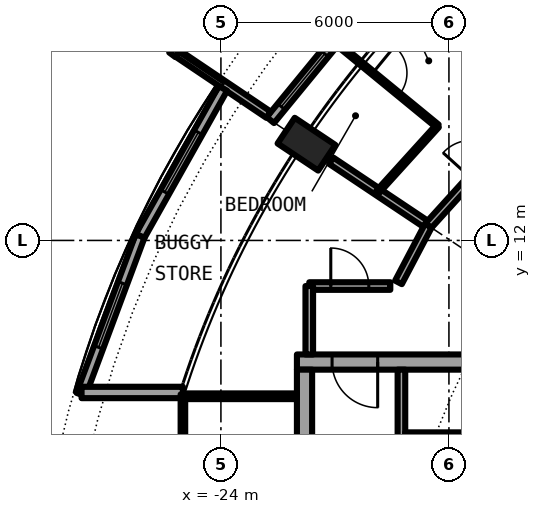
"""IFC4 building model, lengths in metres.
Left out: names, types, materials, properties, quantities, classifications, styles, units other than length and angle.
Written with IfcOpenShell. Run it as: python <this file> out.ifc"""

import sys

from ifc_helpers import new_model, si_unit, direction, frame, frame_2d, origin, origin_2d, place, context, subcontext, project, spatial, rectangle, circle, hollow_circle, extrude, element, fill, save


model = new_model("IFC4")
c1 = context("Model", 3, precision=1e-05, world=origin(), true_north=direction((0.0, 1.0)))
c2 = subcontext(c1, "Body", "Model", "MODEL_VIEW")
j1 = project(units=[si_unit("LENGTHUNIT", "METRE"), si_unit("PLANEANGLEUNIT", "RADIAN")], contexts=[c1])
p1 = place(None, origin())
s1 = spatial("IfcSite", under=j1, at=p1, CompositionType="ELEMENT")
p2 = place(p1, origin())
s2 = spatial("IfcBuilding", under=s1, at=p2, CompositionType="ELEMENT")
p3 = place(p2, frame((0.0, 0.0, 234.05)))
s3 = spatial("IfcBuildingStorey", under=s2, at=p3, CompositionType="ELEMENT", Elevation=234.05)
p4 = place(p3, frame((-22.283, 14.889, 0.0), z_axis=(0.346913947437, -0.231777820067, 0.908806775502), x_axis=(0.555532669549, 0.831494710184, 0.0)))
e1 = element("IfcColumn", 1, at=p4, inside=s3, PredefinedType="COLUMN", context=c2, shape_type="SweptSolid", body=[
    extrude(hollow_circle(Radius=0.406, WallThickness=0.03, at=origin_2d()), origin(), (0.0, 0.0, 1.0), 3.081),
])
p5 = place(p3, frame((-19.304, 19.304, 0.0), z_axis=(0.0, 0.0, 1.0), x_axis=(-0.634382322723, -0.773019449054, 0.0)))
e2 = element("IfcWall", 2, at=p5, inside=s3, PredefinedType="SOLIDWALL", context=c2, shape_type="SweptSolid", body=[
    extrude(rectangle(XDim=5.352, YDim=0.25, at=frame_2d((2.676, 0.0))), origin(), (0.0, 0.0, 1.0), 2.7),
])
p6 = place(p5, frame((0.841, 0.0, 0.0)))
e3 = element("IfcOpeningElement", 3, at=p6, cuts=e2, PredefinedType="OPENING", context=c2, shape_type="SweptSolid", body=[
    extrude(rectangle(XDim=1.0, YDim=2.2, at=frame_2d((0.5, 1.1))), frame((0.0, 0.135, 0.0), z_axis=(0.0, -1.0, 0.0), x_axis=(1.0, 0.0, 0.0)), (0.0, 0.0, 1.0), 0.27),
])
p7 = place(p5, frame((3.096, 0.0, 0.3)))
e4 = element("IfcOpeningElement", 4, at=p7, cuts=e2, PredefinedType="OPENING", context=c2, shape_type="SweptSolid", body=[
    extrude(rectangle(XDim=1.8, YDim=2.1, at=frame_2d((0.9, 1.05))), frame((0.0, 0.135, 0.0), z_axis=(0.0, -1.0, 0.0), x_axis=(1.0, 0.0, 0.0)), (0.0, 0.0, 1.0), 0.27),
])
p8 = place(p3, frame((-23.496, 19.289, -0.03), z_axis=(0.0, 0.0, 1.0), x_axis=(-0.595908005124, -0.803052706508, 0.0)))
e5 = element("IfcWall", 5, at=p8, inside=s3, PredefinedType="SOLIDWALL", context=c2, shape_type="SweptSolid", body=[
    extrude(rectangle(XDim=2.994, YDim=0.2, at=frame_2d((1.497, 0.0))), origin(), (0.0, 0.0, 1.0), 2.73),
])
p9 = place(p8, frame((0.457, 0.0, 0.33)))
e6 = element("IfcOpeningElement", 6, at=p9, cuts=e5, PredefinedType="OPENING", context=c2, shape_type="SweptSolid", body=[
    extrude(circle(Radius=1.04, at=frame_2d((1.04, 1.04))), frame((0.0, 0.11, 0.0), z_axis=(0.0, -1.0, 0.0), x_axis=(1.0, 0.0, 0.0)), (0.0, 0.0, 1.0), 0.22),
])
p10 = place(p3, frame((-22.746, 15.307, -0.03), z_axis=(0.0, 0.0, 1.0), x_axis=(-0.829448139117, 0.558583730979, 0.0)))
e7 = element("IfcWall", 7, at=p10, inside=s3, PredefinedType="SOLIDWALL", context=c2, shape_type="SweptSolid", body=[
    extrude(rectangle(XDim=2.883, YDim=0.2, at=frame_2d((1.441, 0.0))), origin(), (0.0, 0.0, 1.0), 2.73),
])
p11 = place(p3, frame((-23.946, 16.0, 0.0), z_axis=(0.0, 0.0, 1.0), x_axis=(-0.489696356642, -0.871893042919, 0.0)))
e8 = element("IfcWall", 8, at=p11, inside=s3, PredefinedType="SOLIDWALL", context=c2, shape_type="SweptSolid", body=[
    extrude(rectangle(XDim=4.454, YDim=0.25, at=frame_2d((2.227, 0.0))), origin(), (0.0, 0.0, 1.0), 2.7),
])
p12 = place(p11, frame((1.327, 0.0, 0.3)))
e9 = element("IfcOpeningElement", 9, at=p12, cuts=e8, PredefinedType="OPENING", context=c2, shape_type="SweptSolid", body=[
    extrude(rectangle(XDim=1.8, YDim=2.1, at=frame_2d((0.9, 1.05))), frame((0.0, 0.135, 0.0), z_axis=(0.0, -1.0, 0.0), x_axis=(1.0, 0.0, 0.0)), (0.0, 0.0, 1.0), 0.27),
])
p13 = place(p3, frame((-26.127, 12.117, 0.0), z_axis=(0.0, 0.0, 1.0), x_axis=(-0.349247811493, -0.937030397675, 0.0)))
e10 = element("IfcWall", 10, at=p13, inside=s3, PredefinedType="SOLIDWALL", context=c2, shape_type="SweptSolid", body=[
    extrude(rectangle(XDim=4.452, YDim=0.25, at=frame_2d((2.226, 0.0))), origin(), (0.0, 0.0, 1.0), 2.7),
])
p14 = place(p13, frame((1.327, 0.0, 0.3)))
e11 = element("IfcOpeningElement", 11, at=p14, cuts=e10, PredefinedType="OPENING", context=c2, shape_type="SweptSolid", body=[
    extrude(rectangle(XDim=1.8, YDim=2.1, at=frame_2d((0.9, 1.05))), frame((0.0, 0.135, 0.0), z_axis=(0.0, -1.0, 0.0), x_axis=(1.0, 0.0, 0.0)), (0.0, 0.0, 1.0), 0.27),
])
p15 = place(p3, frame((-25.0, 8.0, 0.0), z_axis=(0.0, 0.0, 1.0), x_axis=(-1.0, 0.0, 0.0)))
e12 = element("IfcWall", 12, at=p15, inside=s3, PredefinedType="SOLIDWALL", context=c2, shape_type="SweptSolid", body=[
    extrude(rectangle(XDim=2.667, YDim=0.3, at=frame_2d((1.333, 0.0))), origin(), (0.0, 0.0, 1.0), 2.7),
])
p16 = place(p3, frame((-8.6, 8.8, 0.0), z_axis=(0.0, 0.0, 1.0), x_axis=(-1.0, 0.0, 0.0)))
e13 = element("IfcWall", 13, at=p16, inside=s3, PredefinedType="SHEAR", context=c2, shape_type="SweptSolid", body=[
    extrude(rectangle(XDim=13.4, YDim=0.4, at=frame_2d((6.7, 0.0))), origin(), (0.0, 0.0, 1.0), 3.05),
])
p17 = place(p16, frame((11.275, 0.0, 0.0)))
e14 = element("IfcOpeningElement", 14, at=p17, cuts=e13, PredefinedType="OPENING", context=c2, shape_type="SweptSolid", body=[
    extrude(rectangle(XDim=1.2, YDim=2.3, at=frame_2d((0.6, 1.15))), frame((0.0, 0.21, 0.0), z_axis=(0.0, -1.0, 0.0), x_axis=(1.0, 0.0, 0.0)), (0.0, 0.0, 1.0), 0.42),
])
p18 = place(p3, frame((-21.8, -8.6, 0.0), z_axis=(0.0, 0.0, 1.0), x_axis=(0.0, 1.0, 0.0)))
e15 = element("IfcWall", 15, at=p18, inside=s3, PredefinedType="SHEAR", context=c2, shape_type="SweptSolid", body=[
    extrude(rectangle(XDim=17.2, YDim=0.4, at=frame_2d((8.6, 0.0))), origin(), (0.0, 0.0, 1.0), 3.05),
])
p19 = place(p18, frame((7.7, 0.0, 0.0)))
e16 = element("IfcOpeningElement", 16, at=p19, cuts=e15, PredefinedType="OPENING", context=c2, shape_type="SweptSolid", body=[
    extrude(rectangle(XDim=1.8, YDim=2.3, at=frame_2d((0.9, 1.15))), frame((0.0, 0.21, 0.0), z_axis=(0.0, -1.0, 0.0), x_axis=(1.0, 0.0, 0.0)), (0.0, 0.0, 1.0), 0.42),
])
p20 = place(p3, frame((-19.25, 8.6, 0.0), z_axis=(0.0, 0.0, 1.0), x_axis=(0.0, -1.0, 0.0)))
e17 = element("IfcWall", 17, at=p20, inside=s3, PredefinedType="SOLIDWALL", context=c2, shape_type="SweptSolid", body=[
    extrude(rectangle(XDim=7.025, YDim=0.2, at=frame_2d((3.513, 0.0))), origin(), (0.0, 0.0, 1.0), 2.7),
])
p21 = place(p20, frame((2.35, 0.0, 0.0)))
e18 = element("IfcOpeningElement", 18, at=p21, cuts=e17, PredefinedType="OPENING", context=c2, shape_type="SweptSolid", body=[
    extrude(rectangle(XDim=1.1, YDim=2.3, at=frame_2d((0.55, 1.15))), frame((0.0, 0.11, 0.0), z_axis=(0.0, -1.0, 0.0), x_axis=(1.0, 0.0, 0.0)), (0.0, 0.0, 1.0), 0.22),
])
p22 = place(p3, frame((-15.45, 6.875, 0.0), z_axis=(0.0, 0.0, 1.0), x_axis=(-1.0, 0.0, 0.0)))
e19 = element("IfcWall", 19, at=p22, inside=s3, PredefinedType="PARTITIONING", context=c2, shape_type="SweptSolid", body=[
    extrude(rectangle(XDim=3.7, YDim=0.15, at=frame_2d((1.85, 0.0))), origin(), (0.0, 0.0, 1.0), 2.7),
])
p23 = place(p22, frame((1.4, 0.0, 0.0)))
e20 = element("IfcOpeningElement", 20, at=p23, cuts=e19, PredefinedType="OPENING", context=c2, shape_type="SweptSolid", body=[
    extrude(rectangle(XDim=0.9, YDim=2.3, at=frame_2d((0.45, 1.15))), frame((0.0, 0.085, 0.0), z_axis=(0.0, -1.0, 0.0), x_axis=(1.0, 0.0, 0.0)), (0.0, 0.0, 1.0), 0.17),
])
p24 = place(p3, frame((-22.0, 7.9, 0.0), z_axis=(0.0, 0.0, 1.0), x_axis=(-1.0, 0.0, 0.0)))
e21 = element("IfcWall", 21, at=p24, inside=s3, PredefinedType="PARTITIONING", context=c2, shape_type="SweptSolid", body=[
    extrude(rectangle(XDim=2.94, YDim=0.15, at=frame_2d((1.47, 0.0))), origin(), (0.0, 0.0, 1.0), 2.7),
])
p25 = place(p3, frame((-25.0, 7.95, 0.0), z_axis=(0.0, 0.0, 1.0), x_axis=(0.0, -1.0, 0.0)))
e22 = element("IfcWall", 22, at=p25, inside=s3, PredefinedType="PARTITIONING", context=c2, shape_type="SweptSolid", body=[
    extrude(rectangle(XDim=15.9, YDim=0.12, at=frame_2d((7.95, 0.0))), origin(), (0.0, 0.0, 1.0), 2.7),
])
p26 = place(p25, frame((0.95, 0.0, 0.1)))
e23 = element("IfcOpeningElement", 23, at=p26, cuts=e22, PredefinedType="OPENING", context=c2, shape_type="SweptSolid", body=[
    extrude(rectangle(XDim=14.0, YDim=2.35, at=frame_2d((7.0, 1.175))), frame((0.0, 0.07, 0.0), z_axis=(0.0, -1.0, 0.0), x_axis=(1.0, 0.0, 0.0)), (0.0, 0.0, 1.0), 0.14),
])
p27 = place(p3, frame((-21.097, 14.097, 0.0), z_axis=(0.0, 0.0, 1.0), x_axis=(0.831340764735, -0.555763018642, 0.0)))
e24 = element("IfcWall", 24, at=p27, inside=s3, PredefinedType="PARTITIONING", context=c2, shape_type="SweptSolid", body=[
    extrude(rectangle(XDim=3.073, YDim=0.2, at=frame_2d((1.537, 0.0))), origin(), (0.0, 0.0, 1.0), 2.7),
])
p28 = place(p3, frame((-21.012, 17.233, 0.0), z_axis=(0.0, 0.0, 1.0), x_axis=(0.773165322764, -0.634204528267, 0.0)))
e25 = element("IfcWall", 25, at=p28, inside=s3, PredefinedType="PARTITIONING", context=c2, shape_type="SweptSolid", body=[
    extrude(rectangle(XDim=3.505, YDim=0.1, at=frame_2d((1.752, 0.0))), origin(), (0.0, 0.0, 1.0), 2.7),
])
p29 = place(p28, frame((1.303, 0.0, 0.0)))
e26 = element("IfcOpeningElement", 26, at=p29, cuts=e25, PredefinedType="OPENING", context=c2, shape_type="SweptSolid", body=[
    extrude(rectangle(XDim=0.9, YDim=2.3, at=frame_2d((0.45, 1.15))), frame((0.0, 0.06, 0.0), z_axis=(0.0, -1.0, 0.0), x_axis=(1.0, 0.0, 0.0)), (0.0, 0.0, 1.0), 0.12),
])
p30 = place(p3, frame((-21.675, 10.8, 0.0), z_axis=(0.0, 0.0, 1.0), x_axis=(1.0, 0.0, 0.0)))
e27 = element("IfcWall", 27, at=p30, inside=s3, PredefinedType="PARTITIONING", context=c2, shape_type="SweptSolid", body=[
    extrude(rectangle(XDim=2.132, YDim=0.2, at=frame_2d((1.066, 0.0))), origin(), (0.0, 0.0, 1.0), 2.7),
])
p31 = place(p30, frame((0.566, 0.0, 0.0)))
e28 = element("IfcOpeningElement", 28, at=p31, cuts=e27, PredefinedType="OPENING", context=c2, shape_type="SweptSolid", body=[
    extrude(rectangle(XDim=1.0, YDim=2.3, at=frame_2d((0.5, 1.15))), frame((0.0, 0.11, 0.0), z_axis=(0.0, -1.0, 0.0), x_axis=(1.0, 0.0, 0.0)), (0.0, 0.0, 1.0), 0.22),
])
p32 = place(p3, frame((-21.675, 9.0, 0.0), z_axis=(0.0, 0.0, 1.0), x_axis=(0.0, 1.0, 0.0)))
e29 = element("IfcWall", 29, at=p32, inside=s3, PredefinedType="PARTITIONING", context=c2, shape_type="SweptSolid", body=[
    extrude(rectangle(XDim=1.8, YDim=0.2, at=frame_2d((0.9, 0.0))), origin(), (0.0, 0.0, 1.0), 2.7),
])
p33 = place(p3, frame((-18.542, 12.389, 0.0), z_axis=(0.0, 0.0, 1.0), x_axis=(0.671561669125, 0.740948665268, 0.0)))
e30 = element("IfcWall", 30, at=p33, inside=s3, PredefinedType="PARTITIONING", context=c2, shape_type="SweptSolid", body=[
    extrude(rectangle(XDim=6.544, YDim=0.2, at=frame_2d((3.272, 0.0))), origin(), (0.0, 0.0, 1.0), 2.7),
])
p34 = place(p33, frame((1.682, 0.0, 0.0)))
e31 = element("IfcOpeningElement", 31, at=p34, cuts=e30, PredefinedType="OPENING", context=c2, shape_type="SweptSolid", body=[
    extrude(rectangle(XDim=1.0, YDim=2.3, at=frame_2d((0.5, 1.15))), frame((0.0, 0.11, 0.0), z_axis=(0.0, -1.0, 0.0), x_axis=(1.0, 0.0, 0.0)), (0.0, 0.0, 1.0), 0.22),
])
p35 = place(p3, frame((-19.328, 10.896, 0.0), z_axis=(0.0, 0.0, 1.0), x_axis=(0.465812036273, 0.88488369115, 0.0)))
e32 = element("IfcWall", 32, at=p35, inside=s3, PredefinedType="PARTITIONING", context=c2, shape_type="SweptSolid", body=[
    extrude(rectangle(XDim=1.687, YDim=0.2, at=frame_2d((0.844, 0.0))), origin(), (0.0, 0.0, 1.0), 2.7),
])
p36 = place(p3, frame((-19.872, 13.278, 0.0), z_axis=(0.0, 0.0, 1.0), x_axis=(0.671637685376, 0.740879760544, 0.0)))
e33 = element("IfcWall", 33, at=p36, inside=s3, PredefinedType="PARTITIONING", context=c2, shape_type="SweptSolid", body=[
    extrude(rectangle(XDim=2.338, YDim=0.1, at=frame_2d((1.169, 0.0))), origin(), (0.0, 0.0, 1.0), 2.7),
])
p37 = place(p7, origin())
e34 = element("IfcWindow", 34, at=p37, inside=s3, PartitioningType="SINGLE_PANEL", PredefinedType="WINDOW", context=c2, shape_type="SweptSolid", body=[
    extrude(rectangle(XDim=1.8, YDim=2.1, at=frame_2d((0.9, 1.05))), frame((0.0, 0.03, 0.0), z_axis=(0.0, -1.0, 0.0), x_axis=(1.0, 0.0, 0.0)), (0.0, 0.0, 1.0), 0.06),
])
fill(e4, e34)
p38 = place(p12, origin())
e35 = element("IfcWindow", 35, at=p38, inside=s3, PartitioningType="SINGLE_PANEL", PredefinedType="WINDOW", context=c2, shape_type="SweptSolid", body=[
    extrude(rectangle(XDim=1.8, YDim=2.1, at=frame_2d((0.9, 1.05))), frame((0.0, 0.03, 0.0), z_axis=(0.0, -1.0, 0.0), x_axis=(1.0, 0.0, 0.0)), (0.0, 0.0, 1.0), 0.06),
])
fill(e9, e35)
p39 = place(p14, origin())
e36 = element("IfcWindow", 36, at=p39, inside=s3, PartitioningType="SINGLE_PANEL", PredefinedType="WINDOW", context=c2, shape_type="SweptSolid", body=[
    extrude(rectangle(XDim=1.8, YDim=2.1, at=frame_2d((0.9, 1.05))), frame((0.0, 0.03, 0.0), z_axis=(0.0, -1.0, 0.0), x_axis=(1.0, 0.0, 0.0)), (0.0, 0.0, 1.0), 0.06),
])
fill(e11, e36)
p40 = place(p23, origin())
e37 = element("IfcDoor", 37, at=p40, inside=s3, OperationType="SINGLE_SWING_LEFT", PredefinedType="DOOR", context=c2, shape_type="SweptSolid", body=[
    extrude(rectangle(XDim=0.9, YDim=2.3, at=frame_2d((0.45, 1.15))), frame((0.0, 0.025, 0.0), z_axis=(0.0, -1.0, 0.0), x_axis=(1.0, 0.0, 0.0)), (0.0, 0.0, 1.0), 0.05),
])
fill(e20, e37)
p41 = place(p17, origin())
e38 = element("IfcDoor", 38, at=p41, inside=s3, OperationType="SINGLE_SWING_LEFT", PredefinedType="DOOR", context=c2, shape_type="SweptSolid", body=[
    extrude(rectangle(XDim=1.2, YDim=2.3, at=frame_2d((0.6, 1.15))), frame((0.0, 0.025, 0.0), z_axis=(0.0, -1.0, 0.0), x_axis=(1.0, 0.0, 0.0)), (0.0, 0.0, 1.0), 0.05),
])
fill(e14, e38)
p42 = place(p26, origin())
e39 = element("IfcWindow", 39, at=p42, inside=s3, PartitioningType="SINGLE_PANEL", PredefinedType="WINDOW", context=c2, shape_type="SweptSolid", body=[
    extrude(rectangle(XDim=14.0, YDim=2.35, at=frame_2d((7.0, 1.175))), frame((0.0, 0.03, 0.0), z_axis=(0.0, -1.0, 0.0), x_axis=(1.0, 0.0, 0.0)), (0.0, 0.0, 1.0), 0.06),
])
fill(e23, e39)
p43 = place(p29, origin())
e40 = element("IfcDoor", 40, at=p43, inside=s3, OperationType="SINGLE_SWING_LEFT", PredefinedType="DOOR", context=c2, shape_type="SweptSolid", body=[
    extrude(rectangle(XDim=0.9, YDim=2.3, at=frame_2d((0.45, 1.15))), frame((0.0, 0.025, 0.0), z_axis=(0.0, -1.0, 0.0), x_axis=(1.0, 0.0, 0.0)), (0.0, 0.0, 1.0), 0.05),
])
fill(e26, e40)
p44 = place(p31, origin())
e41 = element("IfcDoor", 41, at=p44, inside=s3, OperationType="SINGLE_SWING_LEFT", PredefinedType="DOOR", context=c2, shape_type="SweptSolid", body=[
    extrude(rectangle(XDim=1.0, YDim=2.3, at=frame_2d((0.5, 1.15))), frame((0.0, 0.025, 0.0), z_axis=(0.0, -1.0, 0.0), x_axis=(1.0, 0.0, 0.0)), (0.0, 0.0, 1.0), 0.05),
])
fill(e28, e41)
save(model, sys.argv[1])
